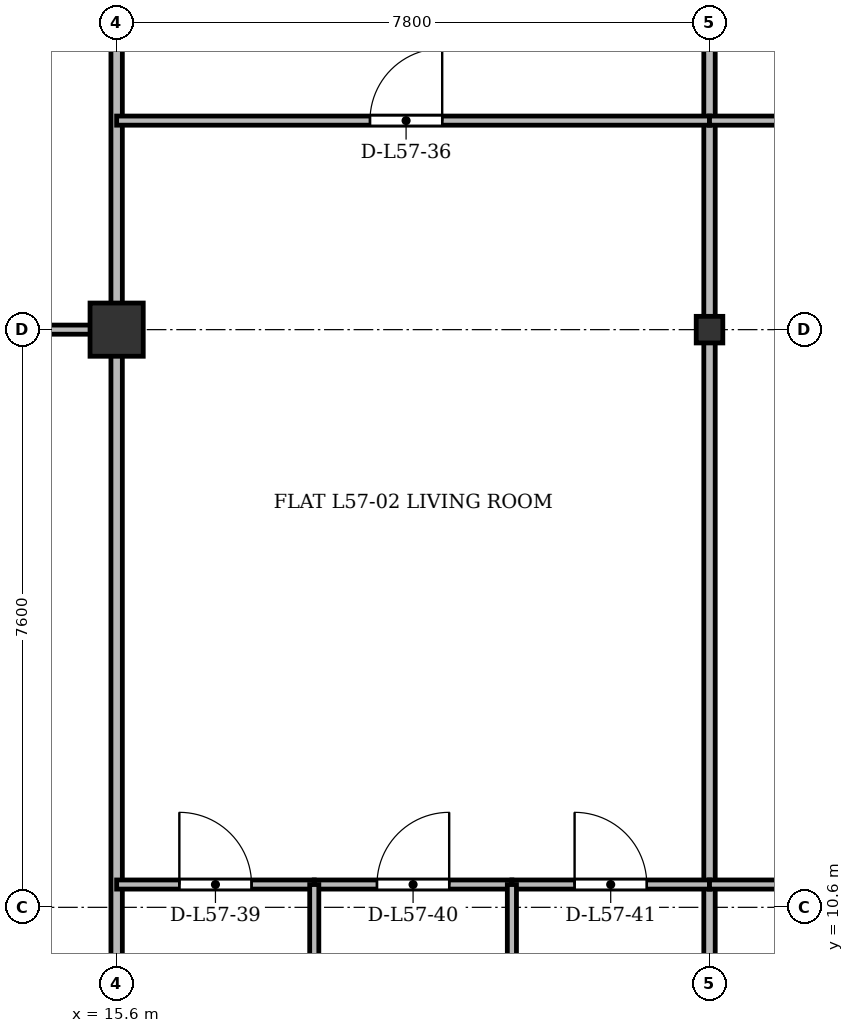
"""IFC4 building model, lengths in metres.
Left out: names, types, materials, properties, quantities, classifications, styles, units other than length and angle.
Written with IfcOpenShell. Run it as: python <this file> out.ifc"""

import sys

from ifc_helpers import new_model, si_unit, direction, frame, frame_2d, origin, origin_2d, place, context, subcontext, project, spatial, rectangle, i_section, extrude, source, transform, mapped, element, fill, save


model = new_model("IFC4")
c1 = context("Model", 3, precision=1e-05, world=origin(), true_north=direction((0.0, 1.0)))
c2 = subcontext(c1, "Body", "Model", "MODEL_VIEW")
j1 = project(units=[si_unit("LENGTHUNIT", "METRE"), si_unit("PLANEANGLEUNIT", "RADIAN")], contexts=[c1])
p1 = place(None, origin())
s1 = spatial("IfcSite", under=j1, at=p1, CompositionType="ELEMENT")
p2 = place(p1, origin())
s2 = spatial("IfcBuilding", under=s1, at=p2, CompositionType="ELEMENT")
p3 = place(p2, frame((0.0, 0.0, 219.3)))
s3 = spatial("IfcBuildingStorey", under=s2, at=p3, CompositionType="ELEMENT", Elevation=219.3)
m1 = source(origin(), c2, "Body", "SweptSolid", [
    extrude(rectangle(XDim=0.7, YDim=0.7, at=origin_2d()), origin(), (0.0, 0.0, 1.0), 3.6),
])
p4 = place(p3, frame((15.6, 18.2, 0.0), z_axis=(0.0, 0.0, 1.0), x_axis=(1.0, 0.0, 0.0)))
e1 = element("IfcColumn", 1, at=p4, inside=s3, PredefinedType="COLUMN", context=c2, shape_type="MappedRepresentation", body=[
    mapped(m1, transform((0.0, 0.0, 0.0), x_axis=(1.0, 0.0, 0.0), y_axis=(0.0, 1.0, 0.0), z_axis=(0.0, 0.0, 1.0), scale=1.0)),
])
m2 = source(origin(), c2, "Body", "SweptSolid", [
    extrude(i_section(OverallWidth=0.35, OverallDepth=0.35, WebThickness=0.018, FlangeThickness=0.028, at=origin_2d()), origin(), (0.0, 0.0, 1.0), 3.6),
])
p5 = place(p3, frame((23.4, 18.2, 0.0), z_axis=(0.0, 0.0, 1.0), x_axis=(1.0, 0.0, 0.0)))
e2 = element("IfcColumn", 2, at=p5, inside=s3, PredefinedType="COLUMN", context=c2, shape_type="MappedRepresentation", body=[
    mapped(m2, transform((0.0, 0.0, 0.0), x_axis=(1.0, 0.0, 0.0), y_axis=(0.0, 1.0, 0.0), z_axis=(0.0, 0.0, 1.0), scale=1.0)),
])
for number, where, z_axis, x_axis in (
    (3, (15.6, 3.625, 0.0), (0.0, 0.0, 1.0), (0.0, 1.0, 0.0)),
    (4, (23.4, 3.625, 0.0), (0.0, 0.0, 1.0), (0.0, 1.0, 0.0)),
):
    element("IfcWall", number, at=place(p3, frame(where, z_axis=z_axis, x_axis=x_axis)), inside=s3, PredefinedType="PARTITIONING", context=c2, shape_type="SweptSolid", body=[
        extrude(rectangle(XDim=27.375, YDim=0.15, at=frame_2d((13.688, 0.0))), origin(), (0.0, 0.0, 1.0), 2.86),
    ])
p6 = place(p3, frame((8.24, 18.2, 0.0), z_axis=(0.0, 0.0, 1.0), x_axis=(1.0, 0.0, 0.0)))
e5 = element("IfcWall", 5, at=p6, inside=s3, PredefinedType="PARTITIONING", context=c2, shape_type="SweptSolid", body=[
    extrude(rectangle(XDim=7.36, YDim=0.12, at=frame_2d((3.68, 0.0))), origin(), (0.0, 0.0, 1.0), 2.91),
])
p7 = place(p6, frame((3.114, 0.0, 0.0)))
e6 = element("IfcOpeningElement", 6, at=p7, cuts=e5, PredefinedType="OPENING", context=c2, shape_type="SweptSolid", body=[
    extrude(rectangle(XDim=0.95, YDim=2.15, at=frame_2d((0.475, 1.075))), frame((0.0, 0.07, 0.0), z_axis=(0.0, -1.0, 0.0), x_axis=(1.0, 0.0, 0.0)), (0.0, 0.0, 1.0), 0.14),
])
p8 = place(p3, frame((15.6, 20.95, 0.0), z_axis=(0.0, 0.0, 1.0), x_axis=(1.0, 0.0, 0.0)))
e7 = element("IfcWall", 7, at=p8, inside=s3, PredefinedType="PARTITIONING", context=c2, shape_type="SweptSolid", body=[
    extrude(rectangle(XDim=7.8, YDim=0.12, at=frame_2d((3.9, 0.0))), origin(), (0.0, 0.0, 1.0), 2.86),
])
p9 = place(p8, frame((3.333, 0.0, 0.0)))
e8 = element("IfcOpeningElement", 8, at=p9, cuts=e7, PredefinedType="OPENING", context=c2, shape_type="SweptSolid", body=[
    extrude(rectangle(XDim=0.95, YDim=2.15, at=frame_2d((0.475, 1.075))), frame((0.0, 0.07, 0.0), z_axis=(0.0, -1.0, 0.0), x_axis=(1.0, 0.0, 0.0)), (0.0, 0.0, 1.0), 0.14),
])
p10 = place(p3, frame((15.6, 10.9, 0.0), z_axis=(0.0, 0.0, 1.0), x_axis=(1.0, 0.0, 0.0)))
e9 = element("IfcWall", 9, at=p10, inside=s3, PredefinedType="PARTITIONING", context=c2, shape_type="SweptSolid", body=[
    extrude(rectangle(XDim=2.6, YDim=0.12, at=frame_2d((1.3, 0.0))), origin(), (0.0, 0.0, 1.0), 2.86),
])
p11 = place(p10, frame((0.825, 0.0, 0.0)))
e10 = element("IfcOpeningElement", 10, at=p11, cuts=e9, PredefinedType="OPENING", context=c2, shape_type="SweptSolid", body=[
    extrude(rectangle(XDim=0.95, YDim=2.15, at=frame_2d((0.475, 1.075))), frame((0.0, 0.07, 0.0), z_axis=(0.0, -1.0, 0.0), x_axis=(1.0, 0.0, 0.0)), (0.0, 0.0, 1.0), 0.14),
])
p12 = place(p3, frame((18.2, 10.9, 0.0), z_axis=(0.0, 0.0, 1.0), x_axis=(1.0, 0.0, 0.0)))
e11 = element("IfcWall", 11, at=p12, inside=s3, PredefinedType="PARTITIONING", context=c2, shape_type="SweptSolid", body=[
    extrude(rectangle(XDim=2.6, YDim=0.12, at=frame_2d((1.3, 0.0))), origin(), (0.0, 0.0, 1.0), 3.06),
])
p13 = place(p12, frame((0.825, 0.0, 0.0)))
e12 = element("IfcOpeningElement", 12, at=p13, cuts=e11, PredefinedType="OPENING", context=c2, shape_type="SweptSolid", body=[
    extrude(rectangle(XDim=0.95, YDim=2.15, at=frame_2d((0.475, 1.075))), frame((0.0, 0.07, 0.0), z_axis=(0.0, -1.0, 0.0), x_axis=(1.0, 0.0, 0.0)), (0.0, 0.0, 1.0), 0.14),
])
p14 = place(p3, frame((18.2, 3.625, 0.0), z_axis=(0.0, 0.0, 1.0), x_axis=(0.0, 1.0, 0.0)))
e13 = element("IfcWall", 13, at=p14, inside=s3, PredefinedType="PARTITIONING", context=c2, shape_type="SweptSolid", body=[
    extrude(rectangle(XDim=7.275, YDim=0.12, at=frame_2d((3.637, 0.0))), origin(), (0.0, 0.0, 1.0), 2.91),
])
p15 = place(p3, frame((20.8, 10.9, 0.0), z_axis=(0.0, 0.0, 1.0), x_axis=(1.0, 0.0, 0.0)))
e14 = element("IfcWall", 14, at=p15, inside=s3, PredefinedType="PARTITIONING", context=c2, shape_type="SweptSolid", body=[
    extrude(rectangle(XDim=2.6, YDim=0.12, at=frame_2d((1.3, 0.0))), origin(), (0.0, 0.0, 1.0), 2.86),
])
p16 = place(p15, frame((0.825, 0.0, 0.0)))
e15 = element("IfcOpeningElement", 15, at=p16, cuts=e14, PredefinedType="OPENING", context=c2, shape_type="SweptSolid", body=[
    extrude(rectangle(XDim=0.95, YDim=2.15, at=frame_2d((0.475, 1.075))), frame((0.0, 0.07, 0.0), z_axis=(0.0, -1.0, 0.0), x_axis=(1.0, 0.0, 0.0)), (0.0, 0.0, 1.0), 0.14),
])
p17 = place(p3, frame((20.8, 3.625, 0.0), z_axis=(0.0, 0.0, 1.0), x_axis=(0.0, 1.0, 0.0)))
e16 = element("IfcWall", 16, at=p17, inside=s3, PredefinedType="PARTITIONING", context=c2, shape_type="SweptSolid", body=[
    extrude(rectangle(XDim=7.275, YDim=0.12, at=frame_2d((3.637, 0.0))), origin(), (0.0, 0.0, 1.0), 2.91),
])
p18 = place(p3, frame((23.4, 20.95, 0.0), z_axis=(0.0, 0.0, 1.0), x_axis=(1.0, 0.0, 0.0)))
e17 = element("IfcWall", 17, at=p18, inside=s3, PredefinedType="PARTITIONING", context=c2, shape_type="SweptSolid", body=[
    extrude(rectangle(XDim=7.2, YDim=0.12, at=frame_2d((3.6, 0.0))), origin(), (0.0, 0.0, 1.0), 2.86),
])
p19 = place(p18, frame((3.125, 0.0, 0.0)))
e18 = element("IfcOpeningElement", 18, at=p19, cuts=e17, PredefinedType="OPENING", context=c2, shape_type="SweptSolid", body=[
    extrude(rectangle(XDim=0.95, YDim=2.15, at=frame_2d((0.475, 1.075))), frame((0.0, 0.07, 0.0), z_axis=(0.0, -1.0, 0.0), x_axis=(1.0, 0.0, 0.0)), (0.0, 0.0, 1.0), 0.14),
])
p20 = place(p3, frame((23.4, 10.9, 0.0), z_axis=(0.0, 0.0, 1.0), x_axis=(1.0, 0.0, 0.0)))
e19 = element("IfcWall", 19, at=p20, inside=s3, PredefinedType="PARTITIONING", context=c2, shape_type="SweptSolid", body=[
    extrude(rectangle(XDim=3.6, YDim=0.12, at=frame_2d((1.8, 0.0))), origin(), (0.0, 0.0, 1.0), 2.86),
])
p21 = place(p20, frame((1.325, 0.0, 0.0)))
e20 = element("IfcOpeningElement", 20, at=p21, cuts=e19, PredefinedType="OPENING", context=c2, shape_type="SweptSolid", body=[
    extrude(rectangle(XDim=0.95, YDim=2.15, at=frame_2d((0.475, 1.075))), frame((0.0, 0.07, 0.0), z_axis=(0.0, -1.0, 0.0), x_axis=(1.0, 0.0, 0.0)), (0.0, 0.0, 1.0), 0.14),
])
m3 = source(origin(), c2, "Body", "SweptSolid", [
    extrude(rectangle(XDim=0.95, YDim=2.15, at=frame_2d((0.475, 1.075))), frame((0.0, 0.025, 0.0), z_axis=(0.0, -1.0, 0.0), x_axis=(1.0, 0.0, 0.0)), (0.0, 0.0, 1.0), 0.05),
])
p22 = place(p9, origin())
e21 = element("IfcDoor", 21, at=p22, inside=s3, OperationType="SINGLE_SWING_RIGHT", PredefinedType="DOOR", context=c2, shape_type="MappedRepresentation", body=[
    mapped(m3, transform((0.0, 0.0, 0.0), x_axis=(1.0, 0.0, 0.0), y_axis=(0.0, 1.0, 0.0), z_axis=(0.0, 0.0, 1.0), scale=1.0)),
])
fill(e8, e21)
p23 = place(p11, origin())
e22 = element("IfcDoor", 22, at=p23, inside=s3, OperationType="SINGLE_SWING_LEFT", PredefinedType="DOOR", context=c2, shape_type="MappedRepresentation", body=[
    mapped(m3, transform((0.0, 0.0, 0.0), x_axis=(1.0, 0.0, 0.0), y_axis=(0.0, 1.0, 0.0), z_axis=(0.0, 0.0, 1.0), scale=1.0)),
])
fill(e10, e22)
p24 = place(p13, origin())
e23 = element("IfcDoor", 23, at=p24, inside=s3, OperationType="SINGLE_SWING_RIGHT", PredefinedType="DOOR", context=c2, shape_type="MappedRepresentation", body=[
    mapped(m3, transform((0.0, 0.0, 0.0), x_axis=(1.0, 0.0, 0.0), y_axis=(0.0, 1.0, 0.0), z_axis=(0.0, 0.0, 1.0), scale=1.0)),
])
fill(e12, e23)
p25 = place(p16, origin())
e24 = element("IfcDoor", 24, at=p25, inside=s3, OperationType="SINGLE_SWING_LEFT", PredefinedType="DOOR", context=c2, shape_type="MappedRepresentation", body=[
    mapped(m3, transform((0.0, 0.0, 0.0), x_axis=(1.0, 0.0, 0.0), y_axis=(0.0, 1.0, 0.0), z_axis=(0.0, 0.0, 1.0), scale=1.0)),
])
fill(e15, e24)
save(model, sys.argv[1])
